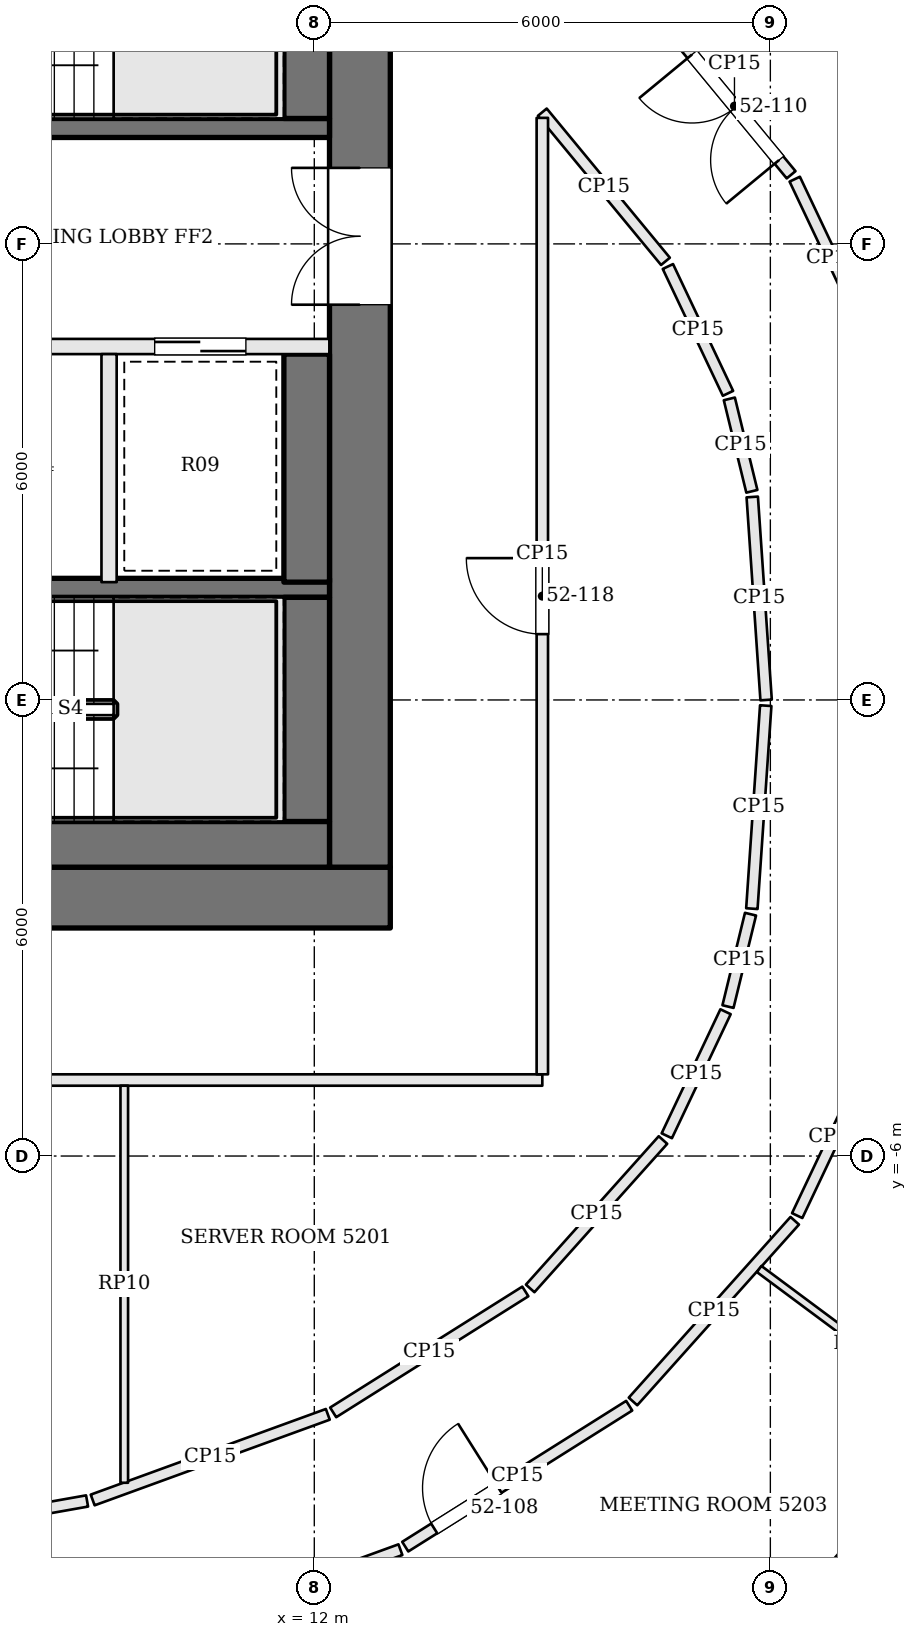
"""IFC4 building model, lengths in metres.
Left out: names, types, materials, properties, quantities, classifications, styles, units other than length and angle.
Written with IfcOpenShell. Run it as: python <this file> out.ifc"""

import sys

from ifc_helpers import new_model, si_unit, direction, frame, frame_2d, origin, place, context, subcontext, project, spatial, rectangle, extrude, element, fill, save


model = new_model("IFC4")
c1 = context("Model", 3, precision=1e-05, world=origin(), true_north=direction((0.0, 1.0)))
c2 = subcontext(c1, "Body", "Model", "MODEL_VIEW")
j1 = project(units=[si_unit("LENGTHUNIT", "METRE"), si_unit("PLANEANGLEUNIT", "RADIAN")], contexts=[c1])
p1 = place(None, origin())
s1 = spatial("IfcSite", under=j1, at=p1, CompositionType="ELEMENT")
p2 = place(p1, origin())
s2 = spatial("IfcBuilding", under=s1, at=p2, CompositionType="ELEMENT")
p3 = place(p2, frame((0.0, 0.0, 213.0)))
s3 = spatial("IfcBuildingStorey", under=s2, at=p3, CompositionType="ELEMENT", Elevation=213.0)
p4 = place(p3, frame((-13.0, -2.6, 0.0), z_axis=(0.0, 0.0, 1.0), x_axis=(1.0, 0.0, 0.0)))
e1 = element("IfcWall", 1, at=p4, inside=s3, PredefinedType="SHEAR", context=c2, shape_type="SweptSolid", body=[
    extrude(rectangle(XDim=26.0, YDim=0.8, at=frame_2d((13.0, 0.0))), origin(), (0.0, 0.0, 1.0), 3.9),
])
p5 = place(p4, frame((8.925, 0.0, 0.0)))
e2 = element("IfcOpeningElement", 2, at=p5, cuts=e1, PredefinedType="OPENING", context=c2, shape_type="SweptSolid", body=[
    extrude(rectangle(XDim=0.9, YDim=2.1, at=frame_2d((0.45, 1.05))), frame((0.0, 0.41, 0.0), z_axis=(0.0, -1.0, 0.0), x_axis=(1.0, 0.0, 0.0)), (0.0, 0.0, 1.0), 0.82),
])
p6 = place(p4, frame((11.475, 0.0, 0.0)))
e3 = element("IfcOpeningElement", 3, at=p6, cuts=e1, PredefinedType="OPENING", context=c2, shape_type="SweptSolid", body=[
    extrude(rectangle(XDim=0.9, YDim=2.1, at=frame_2d((0.45, 1.05))), frame((0.0, 0.41, 0.0), z_axis=(0.0, -1.0, 0.0), x_axis=(1.0, 0.0, 0.0)), (0.0, 0.0, 1.0), 0.82),
])
p7 = place(p4, frame((13.6, 0.0, 0.0)))
e4 = element("IfcOpeningElement", 4, at=p7, cuts=e1, PredefinedType="OPENING", context=c2, shape_type="SweptSolid", body=[
    extrude(rectangle(XDim=1.0, YDim=2.1, at=frame_2d((0.5, 1.05))), frame((0.0, 0.41, 0.0), z_axis=(0.0, -1.0, 0.0), x_axis=(1.0, 0.0, 0.0)), (0.0, 0.0, 1.0), 0.82),
])
p8 = place(p4, frame((15.95, 0.0, 0.0)))
e5 = element("IfcOpeningElement", 5, at=p8, cuts=e1, PredefinedType="OPENING", context=c2, shape_type="SweptSolid", body=[
    extrude(rectangle(XDim=1.0, YDim=2.1, at=frame_2d((0.5, 1.05))), frame((0.0, 0.41, 0.0), z_axis=(0.0, -1.0, 0.0), x_axis=(1.0, 0.0, 0.0)), (0.0, 0.0, 1.0), 0.82),
])
p9 = place(p3, frame((12.6, -2.2, 0.0), z_axis=(0.0, 0.0, 1.0), x_axis=(0.0, 1.0, 0.0)))
e6 = element("IfcWall", 6, at=p9, inside=s3, PredefinedType="SHEAR", context=c2, shape_type="SweptSolid", body=[
    extrude(rectangle(XDim=13.4, YDim=0.8, at=frame_2d((6.7, 0.0))), origin(), (0.0, 0.0, 1.0), 3.9),
])
p10 = place(p9, frame((7.4, 0.0, 0.0)))
e7 = element("IfcOpeningElement", 7, at=p10, cuts=e6, PredefinedType="OPENING", context=c2, shape_type="SweptSolid", body=[
    extrude(rectangle(XDim=1.8, YDim=2.1, at=frame_2d((0.9, 1.05))), frame((0.0, 0.41, 0.0), z_axis=(0.0, -1.0, 0.0), x_axis=(1.0, 0.0, 0.0)), (0.0, 0.0, 1.0), 0.82),
])
p11 = place(p3, frame((12.2, 7.525, 0.0), z_axis=(0.0, 0.0, 1.0), x_axis=(-1.0, 0.0, 0.0)))
e8 = element("IfcWall", 8, at=p11, inside=s3, PredefinedType="SOLIDWALL", context=c2, shape_type="SweptSolid", body=[
    extrude(rectangle(XDim=7.1, YDim=0.25, at=frame_2d((3.55, 0.0))), origin(), (0.0, 0.0, 1.0), 3.6),
])
p12 = place(p11, frame((5.8, 0.0, 0.0)))
e9 = element("IfcOpeningElement", 9, at=p12, cuts=e8, PredefinedType="OPENING", context=c2, shape_type="SweptSolid", body=[
    extrude(rectangle(XDim=1.2, YDim=2.1, at=frame_2d((0.6, 1.05))), frame((0.0, 0.135, 0.0), z_axis=(0.0, -1.0, 0.0), x_axis=(1.0, 0.0, 0.0)), (0.0, 0.0, 1.0), 0.27),
])
p13 = place(p3, frame((12.2, 4.65, 0.0), z_axis=(0.0, 0.0, 1.0), x_axis=(-1.0, 0.0, 0.0)))
e10 = element("IfcWall", 10, at=p13, inside=s3, PredefinedType="SOLIDWALL", context=c2, shape_type="SweptSolid", body=[
    extrude(rectangle(XDim=7.1, YDim=0.2, at=frame_2d((3.55, 0.0))), origin(), (0.0, 0.0, 1.0), 3.6),
])
p14 = place(p13, frame((4.4, 0.0, 0.0)))
e11 = element("IfcOpeningElement", 11, at=p14, cuts=e10, PredefinedType="OPENING", context=c2, shape_type="SweptSolid", body=[
    extrude(rectangle(XDim=1.2, YDim=2.1, at=frame_2d((0.6, 1.05))), frame((0.0, 0.11, 0.0), z_axis=(0.0, -1.0, 0.0), x_axis=(1.0, 0.0, 0.0)), (0.0, 0.0, 1.0), 0.22),
])
p15 = place(p13, frame((1.1, 0.0, 0.0)))
e12 = element("IfcOpeningElement", 12, at=p15, cuts=e10, PredefinedType="OPENING", context=c2, shape_type="SweptSolid", body=[
    extrude(rectangle(XDim=1.2, YDim=2.1, at=frame_2d((0.6, 1.05))), frame((0.0, 0.11, 0.0), z_axis=(0.0, -1.0, 0.0), x_axis=(1.0, 0.0, 0.0)), (0.0, 0.0, 1.0), 0.22),
])
p16 = place(p3, frame((12.2, 1.475, 0.0), z_axis=(0.0, 0.0, 1.0), x_axis=(-1.0, 0.0, 0.0)))
e13 = element("IfcWall", 13, at=p16, inside=s3, PredefinedType="SOLIDWALL", context=c2, shape_type="SweptSolid", body=[
    extrude(rectangle(XDim=7.1, YDim=0.25, at=frame_2d((3.55, 0.0))), origin(), (0.0, 0.0, 1.0), 3.6),
])
p17 = place(p16, frame((5.8, 0.0, 0.0)))
e14 = element("IfcOpeningElement", 14, at=p17, cuts=e13, PredefinedType="OPENING", context=c2, shape_type="SweptSolid", body=[
    extrude(rectangle(XDim=1.2, YDim=2.1, at=frame_2d((0.6, 1.05))), frame((0.0, 0.135, 0.0), z_axis=(0.0, -1.0, 0.0), x_axis=(1.0, 0.0, 0.0)), (0.0, 0.0, 1.0), 0.27),
])
p18 = place(p3, frame((9.3, 4.55, 0.0), z_axis=(0.0, 0.0, 1.0), x_axis=(0.0, -1.0, 0.0)))
e15 = element("IfcWall", 15, at=p18, inside=s3, PredefinedType="SOLIDWALL", context=c2, shape_type="SweptSolid", body=[
    extrude(rectangle(XDim=3.0, YDim=0.2, at=frame_2d((1.5, 0.0))), origin(), (0.0, 0.0, 1.0), 3.6),
])
p19 = place(p3, frame((11.9, 10.6, 0.0), z_axis=(0.0, 0.0, 1.0), x_axis=(0.0, -1.0, 0.0)))
e16 = element("IfcWall", 16, at=p19, inside=s3, PredefinedType="SOLIDWALL", context=c2, shape_type="SweptSolid", body=[
    extrude(rectangle(XDim=2.95, YDim=0.6, at=frame_2d((1.475, 0.0))), origin(), (0.0, 0.0, 1.0), 3.6),
])
p20 = place(p3, frame((11.9, 4.55, 0.0), z_axis=(0.0, 0.0, 1.0), x_axis=(0.0, -1.0, 0.0)))
e17 = element("IfcWall", 17, at=p20, inside=s3, PredefinedType="SOLIDWALL", context=c2, shape_type="SweptSolid", body=[
    extrude(rectangle(XDim=3.0, YDim=0.6, at=frame_2d((1.5, 0.0))), origin(), (0.0, 0.0, 1.0), 3.6),
])
p21 = place(p3, frame((11.9, 1.35, 0.0), z_axis=(0.0, 0.0, 1.0), x_axis=(0.0, -1.0, 0.0)))
e18 = element("IfcWall", 18, at=p21, inside=s3, PredefinedType="SOLIDWALL", context=c2, shape_type="SweptSolid", body=[
    extrude(rectangle(XDim=2.95, YDim=0.6, at=frame_2d((1.475, 0.0))), origin(), (0.0, 0.0, 1.0), 3.6),
])
p22 = place(p3, frame((12.2, -1.9, 0.0), z_axis=(0.0, 0.0, 1.0), x_axis=(-1.0, 0.0, 0.0)))
e19 = element("IfcWall", 19, at=p22, inside=s3, PredefinedType="SOLIDWALL", context=c2, shape_type="SweptSolid", body=[
    extrude(rectangle(XDim=7.1, YDim=0.6, at=frame_2d((3.55, 0.0))), origin(), (0.0, 0.0, 1.0), 3.6),
])
p23 = place(p3, frame((9.676, -12.438, 0.0), z_axis=(0.0, 0.0, 1.0), x_axis=(0.939640289748, 0.342163887461, 0.0)))
e20 = element("IfcWall", 20, at=p23, inside=s3, PredefinedType="PARTITIONING", context=c2, shape_type="SweptSolid", body=[
    extrude(rectangle(XDim=3.68, YDim=0.15, at=frame_2d((1.84, 0.0))), origin(), (0.0, 0.0, 1.0), 2.984),
])
p24 = place(p3, frame((13.197, -11.139, 0.0), z_axis=(0.0, 0.0, 1.0), x_axis=(0.846390903833, 0.532562144644, 0.0)))
e21 = element("IfcWall", 21, at=p24, inside=s3, PredefinedType="PARTITIONING", context=c2, shape_type="SweptSolid", body=[
    extrude(rectangle(XDim=3.481, YDim=0.15, at=frame_2d((1.741, 0.0))), origin(), (0.0, 0.0, 1.0), 2.984),
])
p25 = place(p24, frame((0.45, 0.0, 0.0)))
e22 = element("IfcOpeningElement", 22, at=p25, cuts=e21, PredefinedType="OPENING", context=c2, shape_type="SweptSolid", body=[
    extrude(rectangle(XDim=1.0, YDim=2.4, at=frame_2d((0.5, 1.2))), frame((0.0, 0.085, 0.0), z_axis=(0.0, -1.0, 0.0), x_axis=(1.0, 0.0, 0.0)), (0.0, 0.0, 1.0), 0.17),
])
p26 = place(p3, frame((16.193, -9.229, 0.0), z_axis=(0.0, 0.0, 1.0), x_axis=(0.666882089048, 0.745163256815, 0.0)))
e23 = element("IfcWall", 23, at=p26, inside=s3, PredefinedType="PARTITIONING", context=c2, shape_type="SweptSolid", body=[
    extrude(rectangle(XDim=3.19, YDim=0.15, at=frame_2d((1.595, 0.0))), origin(), (0.0, 0.0, 1.0), 2.984),
])
for number, where, z_axis, x_axis in (
    (24, (18.353, -6.784, 0.0), (0.0, 0.0, 1.0), (0.428, 0.904, 0.0)),
    (25, (19.305, 4.773, 0.0), (0.0, 0.0, 1.0), (-0.428, 0.904, 0.0)),
):
    element("IfcWall", number, at=place(p3, frame(where, z_axis=z_axis, x_axis=x_axis)), inside=s3, PredefinedType="PARTITIONING", context=c2, shape_type="SweptSolid", body=[
        extrude(rectangle(XDim=2.3, YDim=0.15, at=frame_2d((1.15, 0.0))), origin(), (0.0, 0.0, 1.0), 2.984),
    ])
p27 = place(p3, frame((18.273, 6.909, 0.0), z_axis=(0.0, 0.0, 1.0), x_axis=(-0.63653648943, 0.771246586783, 0.0)))
e26 = element("IfcWall", 26, at=p27, inside=s3, PredefinedType="PARTITIONING", context=c2, shape_type="SweptSolid", body=[
    extrude(rectangle(XDim=2.342, YDim=0.15, at=frame_2d((1.171, 0.0))), origin(), (0.0, 0.0, 1.0), 2.984),
])
p28 = place(p27, frame((0.25, 0.0, 0.0)))
e27 = element("IfcOpeningElement", 27, at=p28, cuts=e26, PredefinedType="OPENING", context=c2, shape_type="SweptSolid", body=[
    extrude(rectangle(XDim=1.8, YDim=2.1, at=frame_2d((0.9, 1.05))), frame((0.0, 0.085, 0.0), z_axis=(0.0, -1.0, 0.0), x_axis=(1.0, 0.0, 0.0)), (0.0, 0.0, 1.0), 0.17),
])
p29 = place(p3, frame((15.0, 7.733, 0.0), z_axis=(0.0, 0.0, 1.0), x_axis=(0.636601263488, -0.771193121938, 0.0)))
e28 = element("IfcWall", 28, at=p29, inside=s3, PredefinedType="PARTITIONING", context=c2, shape_type="SweptSolid", body=[
    extrude(rectangle(XDim=2.545, YDim=0.15, at=frame_2d((1.272, 0.0))), origin(), (0.0, 0.0, 1.0), 2.984),
])
p30 = place(p3, frame((16.652, 5.702, 0.0), z_axis=(0.0, 0.0, 1.0), x_axis=(0.428126129773, -0.903718992279, 0.0)))
e29 = element("IfcWall", 29, at=p30, inside=s3, PredefinedType="PARTITIONING", context=c2, shape_type="SweptSolid", body=[
    extrude(rectangle(XDim=1.846, YDim=0.15, at=frame_2d((0.923, 0.0))), origin(), (0.0, 0.0, 1.0), 2.984),
])
p31 = place(p3, frame((17.46, 3.961, 0.0), z_axis=(0.0, 0.0, 1.0), x_axis=(0.236655249498, -0.971593687137, 0.0)))
e30 = element("IfcWall", 30, at=p31, inside=s3, PredefinedType="PARTITIONING", context=c2, shape_type="SweptSolid", body=[
    extrude(rectangle(XDim=1.251, YDim=0.15, at=frame_2d((0.626, 0.0))), origin(), (0.0, 0.0, 1.0), 2.984),
])
p32 = place(p3, frame((17.762, 2.67, 0.0), z_axis=(0.0, 0.0, 1.0), x_axis=(0.068135311644, -0.997676089373, 0.0)))
e31 = element("IfcWall", 31, at=p32, inside=s3, PredefinedType="PARTITIONING", context=c2, shape_type="SweptSolid", body=[
    extrude(rectangle(XDim=2.677, YDim=0.15, at=frame_2d((1.338, 0.0))), origin(), (0.0, 0.0, 1.0), 2.984),
])
p33 = place(p3, frame((17.939, -0.075, 0.0), z_axis=(0.0, 0.0, 1.0), x_axis=(-0.068226099283, -0.99766988497, 0.0)))
e32 = element("IfcWall", 32, at=p33, inside=s3, PredefinedType="PARTITIONING", context=c2, shape_type="SweptSolid", body=[
    extrude(rectangle(XDim=2.677, YDim=0.15, at=frame_2d((1.338, 0.0))), origin(), (0.0, 0.0, 1.0), 2.984),
])
p34 = place(p3, frame((17.739, -2.818, 0.0), z_axis=(0.0, 0.0, 1.0), x_axis=(-0.236884307907, -0.971537865792, 0.0)))
e33 = element("IfcWall", 33, at=p34, inside=s3, PredefinedType="PARTITIONING", context=c2, shape_type="SweptSolid", body=[
    extrude(rectangle(XDim=1.251, YDim=0.15, at=frame_2d((0.625, 0.0))), origin(), (0.0, 0.0, 1.0), 2.984),
])
p35 = place(p3, frame((17.41, -4.102, 0.0), z_axis=(0.0, 0.0, 1.0), x_axis=(-0.428074720318, -0.903743345107, 0.0)))
e34 = element("IfcWall", 34, at=p35, inside=s3, PredefinedType="PARTITIONING", context=c2, shape_type="SweptSolid", body=[
    extrude(rectangle(XDim=1.806, YDim=0.15, at=frame_2d((0.903, 0.0))), origin(), (0.0, 0.0, 1.0), 2.984),
])
p36 = place(p3, frame((16.587, -5.789, 0.0), z_axis=(0.0, 0.0, 1.0), x_axis=(-0.666887460656, -0.745158449472, 0.0)))
e35 = element("IfcWall", 35, at=p36, inside=s3, PredefinedType="PARTITIONING", context=c2, shape_type="SweptSolid", body=[
    extrude(rectangle(XDim=2.62, YDim=0.15, at=frame_2d((1.31, 0.0))), origin(), (0.0, 0.0, 1.0), 2.984),
])
p37 = place(p3, frame((14.777, -7.781, 0.0), z_axis=(0.0, 0.0, 1.0), x_axis=(-0.846359741043, -0.532611667862, 0.0)))
e36 = element("IfcWall", 36, at=p37, inside=s3, PredefinedType="PARTITIONING", context=c2, shape_type="SweptSolid", body=[
    extrude(rectangle(XDim=2.987, YDim=0.15, at=frame_2d((1.494, 0.0))), origin(), (0.0, 0.0, 1.0), 2.984),
])
p38 = place(p3, frame((12.178, -9.398, 0.0), z_axis=(0.0, 0.0, 1.0), x_axis=(-0.939609240084, -0.342249143093, 0.0)))
e37 = element("IfcWall", 37, at=p38, inside=s3, PredefinedType="PARTITIONING", context=c2, shape_type="SweptSolid", body=[
    extrude(rectangle(XDim=3.292, YDim=0.15, at=frame_2d((1.646, 0.0))), origin(), (0.0, 0.0, 1.0), 2.984),
])
p39 = place(p3, frame((9.01, -10.538, 0.0), z_axis=(0.0, 0.0, 1.0), x_axis=(-0.984645638575, -0.174565077936, 0.0)))
e38 = element("IfcWall", 38, at=p39, inside=s3, PredefinedType="PARTITIONING", context=c2, shape_type="SweptSolid", body=[
    extrude(rectangle(XDim=4.358, YDim=0.15, at=frame_2d((2.179, 0.0))), origin(), (0.0, 0.0, 1.0), 2.984),
])
p40 = place(p3, frame((-14.925, -5.0, 0.0), z_axis=(0.0, 0.0, 1.0), x_axis=(1.0, 0.0, 0.0)))
e39 = element("IfcWall", 39, at=p40, inside=s3, PredefinedType="PARTITIONING", context=c2, shape_type="SweptSolid", body=[
    extrude(rectangle(XDim=29.925, YDim=0.15, at=frame_2d((14.962, 0.0))), origin(), (0.0, 0.0, 1.0), 2.984),
])
p41 = place(p40, frame((14.025, 0.0, 0.0)))
e40 = element("IfcOpeningElement", 40, at=p41, cuts=e39, PredefinedType="OPENING", context=c2, shape_type="SweptSolid", body=[
    extrude(rectangle(XDim=1.8, YDim=2.1, at=frame_2d((0.9, 1.05))), frame((0.0, 0.085, 0.0), z_axis=(0.0, -1.0, 0.0), x_axis=(1.0, 0.0, 0.0)), (0.0, 0.0, 1.0), 0.17),
])
p42 = place(p3, frame((15.0, -4.925, 0.0), z_axis=(0.0, 0.0, 1.0), x_axis=(0.0, 1.0, 0.0)))
e41 = element("IfcWall", 41, at=p42, inside=s3, PredefinedType="PARTITIONING", context=c2, shape_type="SweptSolid", body=[
    extrude(rectangle(XDim=12.583, YDim=0.15, at=frame_2d((6.292, 0.0))), origin(), (0.0, 0.0, 1.0), 2.984),
])
p43 = place(p42, frame((5.791, 0.0, 0.0)))
e42 = element("IfcOpeningElement", 42, at=p43, cuts=e41, PredefinedType="OPENING", context=c2, shape_type="SweptSolid", body=[
    extrude(rectangle(XDim=1.0, YDim=2.1, at=frame_2d((0.5, 1.05))), frame((0.0, 0.085, 0.0), z_axis=(0.0, -1.0, 0.0), x_axis=(1.0, 0.0, 0.0)), (0.0, 0.0, 1.0), 0.17),
])
p44 = place(p3, frame((21.149, -8.789, 0.0), z_axis=(0.0, 0.0, 1.0), x_axis=(-0.666915902537, -0.745132994132, 0.0)))
e43 = element("IfcWall", 43, at=p44, inside=s3, PredefinedType="PARTITIONING", context=c2, shape_type="SweptSolid", body=[
    extrude(rectangle(XDim=4.186, YDim=0.1, at=frame_2d((2.093, 0.0))), origin(), (0.0, 0.0, 1.0), 2.984),
])
p45 = place(p3, frame((17.853, -7.487, 0.0), z_axis=(0.0, 0.0, 1.0), x_axis=(0.802681916891, -0.596407361034, 0.0)))
e44 = element("IfcWall", 44, at=p45, inside=s3, PredefinedType="PARTITIONING", context=c2, shape_type="SweptSolid", body=[
    extrude(rectangle(XDim=3.289, YDim=0.1, at=frame_2d((1.645, 0.0))), origin(), (0.0, 0.0, 1.0), 2.984),
])
p46 = place(p3, frame((9.5, -10.299, 0.0), z_axis=(0.0, 0.0, 1.0), x_axis=(0.0, 1.0, 0.0)))
e45 = element("IfcWall", 45, at=p46, inside=s3, PredefinedType="PARTITIONING", context=c2, shape_type="SweptSolid", body=[
    extrude(rectangle(XDim=5.224, YDim=0.1, at=frame_2d((2.612, 0.0))), origin(), (0.0, 0.0, 1.0), 2.984),
])
p47 = place(p10, origin())
e46 = element("IfcDoor", 46, at=p47, inside=s3, OperationType="DOUBLE_DOOR_SINGLE_SWING", PredefinedType="DOOR", context=c2, shape_type="SweptSolid", body=[
    extrude(rectangle(XDim=1.8, YDim=2.1, at=frame_2d((0.9, 1.05))), frame((0.0, 0.025, 0.0), z_axis=(0.0, -1.0, 0.0), x_axis=(1.0, 0.0, 0.0)), (0.0, 0.0, 1.0), 0.05),
])
fill(e7, e46)
p48 = place(p15, origin())
e47 = element("IfcDoor", 47, at=p48, inside=s3, OperationType="SLIDING_TO_RIGHT", PredefinedType="DOOR", context=c2, shape_type="SweptSolid", body=[
    extrude(rectangle(XDim=1.2, YDim=2.1, at=frame_2d((0.6, 1.05))), frame((0.0, 0.025, 0.0), z_axis=(0.0, -1.0, 0.0), x_axis=(1.0, 0.0, 0.0)), (0.0, 0.0, 1.0), 0.05),
])
fill(e12, e47)
p49 = place(p25, origin())
e48 = element("IfcDoor", 48, at=p49, inside=s3, OperationType="SINGLE_SWING_RIGHT", PredefinedType="DOOR", context=c2, shape_type="SweptSolid", body=[
    extrude(rectangle(XDim=1.0, YDim=2.4, at=frame_2d((0.5, 1.2))), frame((0.0, 0.025, 0.0), z_axis=(0.0, -1.0, 0.0), x_axis=(1.0, 0.0, 0.0)), (0.0, 0.0, 1.0), 0.05),
])
fill(e22, e48)
p50 = place(p28, origin())
e49 = element("IfcDoor", 49, at=p50, inside=s3, OperationType="DOUBLE_DOOR_SINGLE_SWING", PredefinedType="DOOR", context=c2, shape_type="SweptSolid", body=[
    extrude(rectangle(XDim=1.8, YDim=2.1, at=frame_2d((0.9, 1.05))), frame((0.0, 0.025, 0.0), z_axis=(0.0, -1.0, 0.0), x_axis=(1.0, 0.0, 0.0)), (0.0, 0.0, 1.0), 0.05),
])
fill(e27, e49)
p51 = place(p43, origin())
e50 = element("IfcDoor", 50, at=p51, inside=s3, OperationType="SINGLE_SWING_RIGHT", PredefinedType="DOOR", context=c2, shape_type="SweptSolid", body=[
    extrude(rectangle(XDim=1.0, YDim=2.1, at=frame_2d((0.5, 1.05))), frame((0.0, 0.025, 0.0), z_axis=(0.0, -1.0, 0.0), x_axis=(1.0, 0.0, 0.0)), (0.0, 0.0, 1.0), 0.05),
])
fill(e42, e50)
save(model, sys.argv[1])
